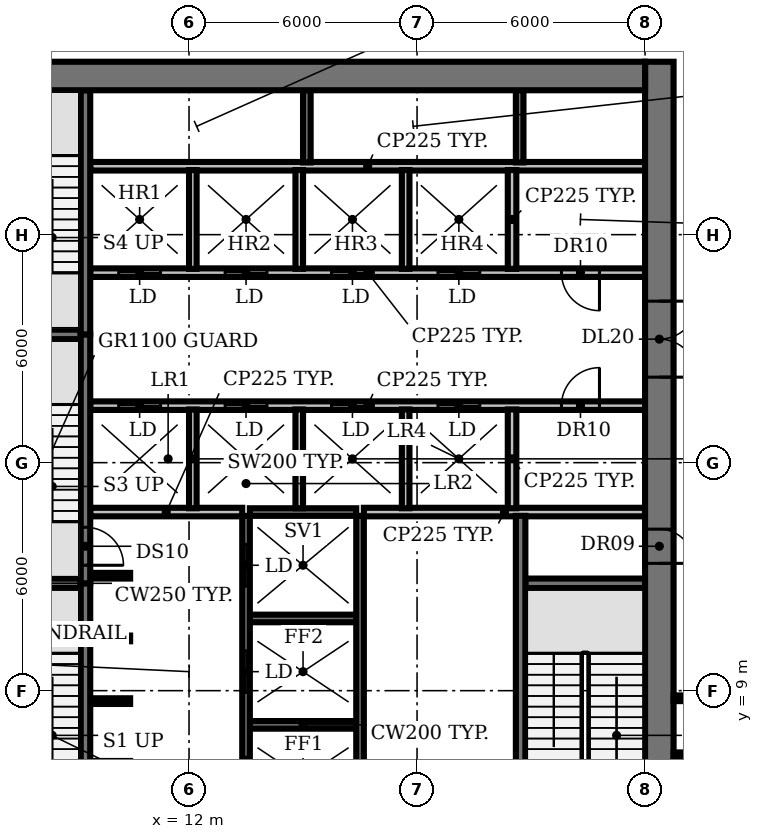
"""IFC4 building model, lengths in metres.
Left out: names, types, materials, properties, quantities, classifications, styles, units other than length and angle.
Written with IfcOpenShell. Run it as: python <this file> out.ifc"""

import sys

from ifc_helpers import new_model, si_unit, direction, frame, frame_2d, origin, place, context, subcontext, project, spatial, rectangle, extrude, element, fill, save


model = new_model("IFC4")
c1 = context("Model", 3, precision=1e-05, world=origin(), true_north=direction((0.0, 1.0)))
c2 = subcontext(c1, "Body", "Model", "MODEL_VIEW")
j1 = project(units=[si_unit("LENGTHUNIT", "METRE"), si_unit("PLANEANGLEUNIT", "RADIAN")], contexts=[c1])
p1 = place(None, origin())
s1 = spatial("IfcSite", under=j1, at=p1, CompositionType="ELEMENT")
p2 = place(p1, origin())
s2 = spatial("IfcBuilding", under=s1, at=p2, CompositionType="ELEMENT")
p3 = place(p2, frame((0.0, 0.0, 138.2)))
s3 = spatial("IfcBuildingStorey", under=s2, at=p3, CompositionType="ELEMENT", Elevation=138.2)
p4 = place(p3, frame((13.6, 8.1, 0.0), z_axis=(0.0, 0.0, 1.0), x_axis=(1.0, 0.0, 0.0)))
e1 = element("IfcWall", 1, at=p4, inside=s3, PredefinedType="SHEAR", context=c2, shape_type="SweptSolid", body=[
    extrude(rectangle(XDim=2.8, YDim=0.2, at=frame_2d((1.4, 0.0))), origin(), (0.0, 0.0, 1.0), 8.05),
])
for number, where, z_axis, x_axis in (
    (2, (9.4, 8.725, 0.0), (0.0, 0.0, 1.0), (1.0, 0.0, 0.0)),
    (3, (9.4, 10.375, 0.0), (0.0, 0.0, 1.0), (1.0, 0.0, 0.0)),
):
    element("IfcWall", number, at=place(p3, frame(where, z_axis=z_axis, x_axis=x_axis)), inside=s3, PredefinedType="SHEAR", context=c2, shape_type="SweptSolid", body=[
        extrude(rectangle(XDim=1.05, YDim=0.15, at=frame_2d((0.525, 0.0))), origin(), (0.0, 0.0, 1.0), 8.05),
    ])
p5 = place(p3, frame((13.6, 10.9, 0.0), z_axis=(0.0, 0.0, 1.0), x_axis=(1.0, 0.0, 0.0)))
e4 = element("IfcWall", 4, at=p5, inside=s3, PredefinedType="SHEAR", context=c2, shape_type="SweptSolid", body=[
    extrude(rectangle(XDim=2.8, YDim=0.2, at=frame_2d((1.4, 0.0))), origin(), (0.0, 0.0, 1.0), 8.05),
])
for number, where, z_axis, x_axis in (
    (5, (6.0, 11.825, 0.0), (0.0, 0.0, 1.0), (1.0, 0.0, 0.0)),
    (6, (20.85, 11.825, 0.0), (0.0, 0.0, 1.0), (1.0, 0.0, 0.0)),
):
    element("IfcWall", number, at=place(p3, frame(where, z_axis=z_axis, x_axis=x_axis)), inside=s3, PredefinedType="SHEAR", context=c2, shape_type="SweptSolid", body=[
        extrude(rectangle(XDim=3.15, YDim=0.25, at=frame_2d((1.575, 0.0))), origin(), (0.0, 0.0, 1.0), 8.05),
    ])
p6 = place(p3, frame((9.4, 12.025, 0.0), z_axis=(0.0, 0.0, 1.0), x_axis=(1.0, 0.0, 0.0)))
e7 = element("IfcWall", 7, at=p6, inside=s3, PredefinedType="SHEAR", context=c2, shape_type="SweptSolid", body=[
    extrude(rectangle(XDim=1.05, YDim=0.15, at=frame_2d((0.525, 0.0))), origin(), (0.0, 0.0, 1.0), 8.05),
])
p7 = place(p3, frame((9.4, 13.7, 0.0), z_axis=(0.0, 0.0, 1.0), x_axis=(1.0, 0.0, 0.0)))
e8 = element("IfcWall", 8, at=p7, inside=s3, PredefinedType="PARTITIONING", context=c2, shape_type="SweptSolid", body=[
    extrude(rectangle(XDim=4.0, YDim=0.225, at=frame_2d((2.0, 0.0))), origin(), (0.0, 0.0, 1.0), 8.05),
])
p8 = place(p3, frame((13.6, 13.7, 0.0), z_axis=(0.0, 0.0, 1.0), x_axis=(1.0, 0.0, 0.0)))
e9 = element("IfcWall", 9, at=p8, inside=s3, PredefinedType="SHEAR", context=c2, shape_type="SweptSolid", body=[
    extrude(rectangle(XDim=2.8, YDim=0.2, at=frame_2d((1.4, 0.0))), origin(), (0.0, 0.0, 1.0), 8.05),
])
p9 = place(p3, frame((16.6, 13.7, 0.0), z_axis=(0.0, 0.0, 1.0), x_axis=(1.0, 0.0, 0.0)))
e10 = element("IfcWall", 10, at=p9, inside=s3, PredefinedType="PARTITIONING", context=c2, shape_type="SweptSolid", body=[
    extrude(rectangle(XDim=7.4, YDim=0.225, at=frame_2d((3.7, 0.0))), origin(), (0.0, 0.0, 1.0), 8.05),
])
p10 = place(p3, frame((9.4, 16.5, 0.0), z_axis=(0.0, 0.0, 1.0), x_axis=(1.0, 0.0, 0.0)))
e11 = element("IfcWall", 11, at=p10, inside=s3, PredefinedType="PARTITIONING", context=c2, shape_type="SweptSolid", body=[
    extrude(rectangle(XDim=14.6, YDim=0.225, at=frame_2d((7.3, 0.0))), origin(), (0.0, 0.0, 1.0), 8.05),
])
p11 = place(p10, frame((0.75, 0.0, 0.0)))
e12 = element("IfcOpeningElement", 12, at=p11, cuts=e11, PredefinedType="OPENING", context=c2, shape_type="SweptSolid", body=[
    extrude(rectangle(XDim=1.1, YDim=2.1, at=frame_2d((0.55, 1.05))), frame((0.0, 0.123, 0.0), z_axis=(0.0, -1.0, 0.0), x_axis=(1.0, 0.0, 0.0)), (0.0, 0.0, 1.0), 0.245),
])
p12 = place(p10, frame((3.55, 0.0, 0.0)))
e13 = element("IfcOpeningElement", 13, at=p12, cuts=e11, PredefinedType="OPENING", context=c2, shape_type="SweptSolid", body=[
    extrude(rectangle(XDim=1.1, YDim=2.1, at=frame_2d((0.55, 1.05))), frame((0.0, 0.123, 0.0), z_axis=(0.0, -1.0, 0.0), x_axis=(1.0, 0.0, 0.0)), (0.0, 0.0, 1.0), 0.245),
])
p13 = place(p10, frame((6.35, 0.0, 0.0)))
e14 = element("IfcOpeningElement", 14, at=p13, cuts=e11, PredefinedType="OPENING", context=c2, shape_type="SweptSolid", body=[
    extrude(rectangle(XDim=1.1, YDim=2.1, at=frame_2d((0.55, 1.05))), frame((0.0, 0.123, 0.0), z_axis=(0.0, -1.0, 0.0), x_axis=(1.0, 0.0, 0.0)), (0.0, 0.0, 1.0), 0.245),
])
p14 = place(p10, frame((9.15, 0.0, 0.0)))
e15 = element("IfcOpeningElement", 15, at=p14, cuts=e11, PredefinedType="OPENING", context=c2, shape_type="SweptSolid", body=[
    extrude(rectangle(XDim=1.1, YDim=2.1, at=frame_2d((0.55, 1.05))), frame((0.0, 0.123, 0.0), z_axis=(0.0, -1.0, 0.0), x_axis=(1.0, 0.0, 0.0)), (0.0, 0.0, 1.0), 0.245),
])
p15 = place(p10, frame((12.4, 0.0, 0.0)))
e16 = element("IfcOpeningElement", 16, at=p15, cuts=e11, PredefinedType="OPENING", context=c2, shape_type="SweptSolid", body=[
    extrude(rectangle(XDim=1.0, YDim=2.1, at=frame_2d((0.5, 1.05))), frame((0.0, 0.123, 0.0), z_axis=(0.0, -1.0, 0.0), x_axis=(1.0, 0.0, 0.0)), (0.0, 0.0, 1.0), 0.245),
])
p16 = place(p3, frame((6.0, 18.375, 0.0), z_axis=(0.0, 0.0, 1.0), x_axis=(1.0, 0.0, 0.0)))
e17 = element("IfcWall", 17, at=p16, inside=s3, PredefinedType="SHEAR", context=c2, shape_type="SweptSolid", body=[
    extrude(rectangle(XDim=3.15, YDim=0.25, at=frame_2d((1.575, 0.0))), origin(), (0.0, 0.0, 1.0), 8.05),
])
p17 = place(p3, frame((24.0, 20.0, 0.0), z_axis=(0.0, 0.0, 1.0), x_axis=(-1.0, 0.0, 0.0)))
e18 = element("IfcWall", 18, at=p17, inside=s3, PredefinedType="PARTITIONING", context=c2, shape_type="SweptSolid", body=[
    extrude(rectangle(XDim=14.6, YDim=0.225, at=frame_2d((7.3, 0.0))), origin(), (0.0, 0.0, 1.0), 8.05),
])
p18 = place(p17, frame((12.75, 0.0, 0.0)))
e19 = element("IfcOpeningElement", 19, at=p18, cuts=e18, PredefinedType="OPENING", context=c2, shape_type="SweptSolid", body=[
    extrude(rectangle(XDim=1.1, YDim=2.1, at=frame_2d((0.55, 1.05))), frame((0.0, 0.123, 0.0), z_axis=(0.0, -1.0, 0.0), x_axis=(1.0, 0.0, 0.0)), (0.0, 0.0, 1.0), 0.245),
])
p19 = place(p17, frame((9.95, 0.0, 0.0)))
e20 = element("IfcOpeningElement", 20, at=p19, cuts=e18, PredefinedType="OPENING", context=c2, shape_type="SweptSolid", body=[
    extrude(rectangle(XDim=1.1, YDim=2.1, at=frame_2d((0.55, 1.05))), frame((0.0, 0.123, 0.0), z_axis=(0.0, -1.0, 0.0), x_axis=(1.0, 0.0, 0.0)), (0.0, 0.0, 1.0), 0.245),
])
p20 = place(p17, frame((7.15, 0.0, 0.0)))
e21 = element("IfcOpeningElement", 21, at=p20, cuts=e18, PredefinedType="OPENING", context=c2, shape_type="SweptSolid", body=[
    extrude(rectangle(XDim=1.1, YDim=2.1, at=frame_2d((0.55, 1.05))), frame((0.0, 0.123, 0.0), z_axis=(0.0, -1.0, 0.0), x_axis=(1.0, 0.0, 0.0)), (0.0, 0.0, 1.0), 0.245),
])
p21 = place(p17, frame((4.35, 0.0, 0.0)))
e22 = element("IfcOpeningElement", 22, at=p21, cuts=e18, PredefinedType="OPENING", context=c2, shape_type="SweptSolid", body=[
    extrude(rectangle(XDim=1.1, YDim=2.1, at=frame_2d((0.55, 1.05))), frame((0.0, 0.123, 0.0), z_axis=(0.0, -1.0, 0.0), x_axis=(1.0, 0.0, 0.0)), (0.0, 0.0, 1.0), 0.245),
])
p22 = place(p17, frame((1.2, 0.0, 0.0)))
e23 = element("IfcOpeningElement", 23, at=p22, cuts=e18, PredefinedType="OPENING", context=c2, shape_type="SweptSolid", body=[
    extrude(rectangle(XDim=1.0, YDim=2.1, at=frame_2d((0.5, 1.05))), frame((0.0, 0.123, 0.0), z_axis=(0.0, -1.0, 0.0), x_axis=(1.0, 0.0, 0.0)), (0.0, 0.0, 1.0), 0.245),
])
p23 = place(p3, frame((9.4, 22.8, 0.0), z_axis=(0.0, 0.0, 1.0), x_axis=(1.0, 0.0, 0.0)))
e24 = element("IfcWall", 24, at=p23, inside=s3, PredefinedType="PARTITIONING", context=c2, shape_type="SweptSolid", body=[
    extrude(rectangle(XDim=14.6, YDim=0.225, at=frame_2d((7.3, 0.0))), origin(), (0.0, 0.0, 1.0), 8.05),
])
p24 = place(p3, frame((9.275, 11.825, 0.0), z_axis=(0.0, 0.0, 1.0), x_axis=(0.0, -1.0, 0.0)))
e25 = element("IfcWall", 25, at=p24, inside=s3, PredefinedType="SHEAR", context=c2, shape_type="SweptSolid", body=[
    extrude(rectangle(XDim=6.425, YDim=0.25, at=frame_2d((3.212, 0.0))), origin(), (0.0, 0.0, 1.0), 8.05),
])
p25 = place(p24, frame((5.075, 0.0, 0.0)))
e26 = element("IfcOpeningElement", 26, at=p25, cuts=e25, PredefinedType="OPENING", context=c2, shape_type="SweptSolid", body=[
    extrude(rectangle(XDim=1.0, YDim=2.1, at=frame_2d((0.5, 1.05))), frame((0.0, 0.135, 0.0), z_axis=(0.0, -1.0, 0.0), x_axis=(1.0, 0.0, 0.0)), (0.0, 0.0, 1.0), 0.27),
])
p26 = place(p3, frame((9.275, 18.375, 0.0), z_axis=(0.0, 0.0, 1.0), x_axis=(0.0, -1.0, 0.0)))
e27 = element("IfcWall", 27, at=p26, inside=s3, PredefinedType="SHEAR", context=c2, shape_type="SweptSolid", body=[
    extrude(rectangle(XDim=6.55, YDim=0.25, at=frame_2d((3.275, 0.0))), origin(), (0.0, 0.0, 1.0), 8.05),
])
p27 = place(p26, frame((5.075, 0.0, 0.0)))
e28 = element("IfcOpeningElement", 28, at=p27, cuts=e27, PredefinedType="OPENING", context=c2, shape_type="SweptSolid", body=[
    extrude(rectangle(XDim=1.0, YDim=2.1, at=frame_2d((0.5, 1.05))), frame((0.0, 0.135, 0.0), z_axis=(0.0, -1.0, 0.0), x_axis=(1.0, 0.0, 0.0)), (0.0, 0.0, 1.0), 0.27),
])
p28 = place(p3, frame((9.275, 18.375, 0.0), z_axis=(0.0, 0.0, 1.0), x_axis=(0.0, 1.0, 0.0)))
e29 = element("IfcWall", 29, at=p28, inside=s3, PredefinedType="SHEAR", context=c2, shape_type="SweptSolid", body=[
    extrude(rectangle(XDim=6.425, YDim=0.25, at=frame_2d((3.212, 0.0))), origin(), (0.0, 0.0, 1.0), 8.05),
])
for number, where, z_axis, x_axis in (
    (30, (12.1, 13.8, 0.0), (0.0, 0.0, 1.0), (0.0, 1.0, 0.0)),
    (31, (12.1, 20.1, 0.0), (0.0, 0.0, 1.0), (0.0, 1.0, 0.0)),
):
    element("IfcWall", number, at=place(p3, frame(where, z_axis=z_axis, x_axis=x_axis)), inside=s3, PredefinedType="SOLIDWALL", context=c2, shape_type="SweptSolid", body=[
        extrude(rectangle(XDim=2.6, YDim=0.2, at=frame_2d((1.3, 0.0))), origin(), (0.0, 0.0, 1.0), 8.05),
    ])
p29 = place(p3, frame((13.5, 5.4, 0.0), z_axis=(0.0, 0.0, 1.0), x_axis=(0.0, 1.0, 0.0)))
e32 = element("IfcWall", 32, at=p29, inside=s3, PredefinedType="SHEAR", context=c2, shape_type="SweptSolid", body=[
    extrude(rectangle(XDim=8.2, YDim=0.2, at=frame_2d((4.1, 0.0))), origin(), (0.0, 0.0, 1.0), 8.05),
])
p30 = place(p29, frame((0.75, 0.0, 0.0)))
e33 = element("IfcOpeningElement", 33, at=p30, cuts=e32, PredefinedType="OPENING", context=c2, shape_type="SweptSolid", body=[
    extrude(rectangle(XDim=1.1, YDim=2.1, at=frame_2d((0.55, 1.05))), frame((0.0, 0.11, 0.0), z_axis=(0.0, -1.0, 0.0), x_axis=(1.0, 0.0, 0.0)), (0.0, 0.0, 1.0), 0.22),
])
p31 = place(p29, frame((3.55, 0.0, 0.0)))
e34 = element("IfcOpeningElement", 34, at=p31, cuts=e32, PredefinedType="OPENING", context=c2, shape_type="SweptSolid", body=[
    extrude(rectangle(XDim=1.1, YDim=2.1, at=frame_2d((0.55, 1.05))), frame((0.0, 0.11, 0.0), z_axis=(0.0, -1.0, 0.0), x_axis=(1.0, 0.0, 0.0)), (0.0, 0.0, 1.0), 0.22),
])
p32 = place(p29, frame((6.35, 0.0, 0.0)))
e35 = element("IfcOpeningElement", 35, at=p32, cuts=e32, PredefinedType="OPENING", context=c2, shape_type="SweptSolid", body=[
    extrude(rectangle(XDim=1.1, YDim=2.1, at=frame_2d((0.55, 1.05))), frame((0.0, 0.11, 0.0), z_axis=(0.0, -1.0, 0.0), x_axis=(1.0, 0.0, 0.0)), (0.0, 0.0, 1.0), 0.22),
])
for number, where, z_axis, x_axis in (
    (36, (14.9, 13.8, 0.0), (0.0, 0.0, 1.0), (0.0, 1.0, 0.0)),
    (37, (14.9, 20.1, 0.0), (0.0, 0.0, 1.0), (0.0, 1.0, 0.0)),
):
    element("IfcWall", number, at=place(p3, frame(where, z_axis=z_axis, x_axis=x_axis)), inside=s3, PredefinedType="SOLIDWALL", context=c2, shape_type="SweptSolid", body=[
        extrude(rectangle(XDim=2.6, YDim=0.2, at=frame_2d((1.3, 0.0))), origin(), (0.0, 0.0, 1.0), 8.05),
    ])
p33 = place(p3, frame((15.1, 22.9, 0.0), z_axis=(0.0, 0.0, 1.0), x_axis=(0.0, 1.0, 0.0)))
e38 = element("IfcWall", 38, at=p33, inside=s3, PredefinedType="SHEAR", context=c2, shape_type="SweptSolid", body=[
    extrude(rectangle(XDim=1.9, YDim=0.2, at=frame_2d((0.95, 0.0))), origin(), (0.0, 0.0, 1.0), 8.05),
])
p34 = place(p3, frame((16.5, 5.4, 0.0), z_axis=(0.0, 0.0, 1.0), x_axis=(0.0, 1.0, 0.0)))
e39 = element("IfcWall", 39, at=p34, inside=s3, PredefinedType="SHEAR", context=c2, shape_type="SweptSolid", body=[
    extrude(rectangle(XDim=8.2, YDim=0.2, at=frame_2d((4.1, 0.0))), origin(), (0.0, 0.0, 1.0), 8.05),
])
for number, where, z_axis, x_axis in (
    (40, (17.7, 13.8, 0.0), (0.0, 0.0, 1.0), (0.0, 1.0, 0.0)),
    (41, (17.7, 20.1, 0.0), (0.0, 0.0, 1.0), (0.0, 1.0, 0.0)),
):
    element("IfcWall", number, at=place(p3, frame(where, z_axis=z_axis, x_axis=x_axis)), inside=s3, PredefinedType="SOLIDWALL", context=c2, shape_type="SweptSolid", body=[
        extrude(rectangle(XDim=2.6, YDim=0.2, at=frame_2d((1.3, 0.0))), origin(), (0.0, 0.0, 1.0), 8.05),
    ])
for number, where, z_axis, x_axis in (
    (42, (20.5, 13.8, 0.0), (0.0, 0.0, 1.0), (0.0, 1.0, 0.0)),
    (43, (20.5, 20.1, 0.0), (0.0, 0.0, 1.0), (0.0, 1.0, 0.0)),
):
    element("IfcWall", number, at=place(p3, frame(where, z_axis=z_axis, x_axis=x_axis)), inside=s3, PredefinedType="PARTITIONING", context=c2, shape_type="SweptSolid", body=[
        extrude(rectangle(XDim=2.6, YDim=0.225, at=frame_2d((1.3, 0.0))), origin(), (0.0, 0.0, 1.0), 8.05),
    ])
p35 = place(p3, frame((20.7, 22.9, 0.0), z_axis=(0.0, 0.0, 1.0), x_axis=(0.0, 1.0, 0.0)))
e44 = element("IfcWall", 44, at=p35, inside=s3, PredefinedType="SHEAR", context=c2, shape_type="SweptSolid", body=[
    extrude(rectangle(XDim=1.9, YDim=0.2, at=frame_2d((0.95, 0.0))), origin(), (0.0, 0.0, 1.0), 8.05),
])
p36 = place(p3, frame((20.725, 5.4, 0.0), z_axis=(0.0, 0.0, 1.0), x_axis=(0.0, 1.0, 0.0)))
e45 = element("IfcWall", 45, at=p36, inside=s3, PredefinedType="SHEAR", context=c2, shape_type="SweptSolid", body=[
    extrude(rectangle(XDim=8.2, YDim=0.25, at=frame_2d((4.1, 0.0))), origin(), (0.0, 0.0, 1.0), 8.05),
])
p37 = place(p3, frame((24.375, 25.55, 0.0), z_axis=(0.0, 0.0, 1.0), x_axis=(0.0, -1.0, 0.0)))
e46 = element("IfcWall", 46, at=p37, inside=s3, PredefinedType="SHEAR", context=c2, shape_type="SweptSolid", body=[
    extrude(rectangle(XDim=20.9, YDim=0.75, at=frame_2d((10.45, 0.0))), origin(), (0.0, 0.0, 1.0), 8.05),
])
p38 = place(p37, frame((18.4, 0.0, 0.0)))
e47 = element("IfcOpeningElement", 47, at=p38, cuts=e46, PredefinedType="OPENING", context=c2, shape_type="SweptSolid", body=[
    extrude(rectangle(XDim=1.5, YDim=2.1, at=frame_2d((0.75, 1.05))), frame((0.0, 0.385, 0.0), z_axis=(0.0, -1.0, 0.0), x_axis=(1.0, 0.0, 0.0)), (0.0, 0.0, 1.0), 0.77),
])
p39 = place(p37, frame((12.3, 0.0, 0.0)))
e48 = element("IfcOpeningElement", 48, at=p39, cuts=e46, PredefinedType="OPENING", context=c2, shape_type="SweptSolid", body=[
    extrude(rectangle(XDim=0.9, YDim=2.1, at=frame_2d((0.45, 1.05))), frame((0.0, 0.385, 0.0), z_axis=(0.0, -1.0, 0.0), x_axis=(1.0, 0.0, 0.0)), (0.0, 0.0, 1.0), 0.77),
])
p40 = place(p37, frame((6.3, 0.0, 0.0)))
e49 = element("IfcOpeningElement", 49, at=p40, cuts=e46, PredefinedType="OPENING", context=c2, shape_type="SweptSolid", body=[
    extrude(rectangle(XDim=2.0, YDim=2.1, at=frame_2d((1.0, 1.05))), frame((0.0, 0.385, 0.0), z_axis=(0.0, -1.0, 0.0), x_axis=(1.0, 0.0, 0.0)), (0.0, 0.0, 1.0), 0.77),
])
p41 = place(p3, frame((6.0, 25.175, 0.0), z_axis=(0.0, 0.0, 1.0), x_axis=(1.0, 0.0, 0.0)))
e50 = element("IfcWall", 50, at=p41, inside=s3, PredefinedType="SHEAR", context=c2, shape_type="SweptSolid", body=[
    extrude(rectangle(XDim=18.0, YDim=0.75, at=frame_2d((9.0, 0.0))), origin(), (0.0, 0.0, 1.0), 8.05),
])
for number, where, z_axis, x_axis in (
    (51, (24.75, 7.3, 0.0), (0.0, 0.0, 1.0), (1.0, 0.0, 0.0)),
    (52, (24.75, 8.8, 0.0), (0.0, 0.0, 1.0), (1.0, 0.0, 0.0)),
):
    element("IfcWall", number, at=place(p3, frame(where, z_axis=z_axis, x_axis=x_axis)), inside=s3, PredefinedType="PARTITIONING", context=c2, shape_type="SweptSolid", body=[
        extrude(rectangle(XDim=1.05, YDim=0.15, at=frame_2d((0.525, 0.0))), origin(), (0.0, 0.0, 1.0), 6.33),
    ])
p42 = place(p11, origin())
e53 = element("IfcDoor", 53, at=p42, inside=s3, OperationType="DOUBLE_DOOR_SLIDING", PredefinedType="DOOR", context=c2, shape_type="SweptSolid", body=[
    extrude(rectangle(XDim=1.1, YDim=2.1, at=frame_2d((0.55, 1.05))), frame((0.0, 0.025, 0.0), z_axis=(0.0, -1.0, 0.0), x_axis=(1.0, 0.0, 0.0)), (0.0, 0.0, 1.0), 0.05),
])
fill(e12, e53)
p43 = place(p12, origin())
e54 = element("IfcDoor", 54, at=p43, inside=s3, OperationType="DOUBLE_DOOR_SLIDING", PredefinedType="DOOR", context=c2, shape_type="SweptSolid", body=[
    extrude(rectangle(XDim=1.1, YDim=2.1, at=frame_2d((0.55, 1.05))), frame((0.0, 0.025, 0.0), z_axis=(0.0, -1.0, 0.0), x_axis=(1.0, 0.0, 0.0)), (0.0, 0.0, 1.0), 0.05),
])
fill(e13, e54)
p44 = place(p13, origin())
e55 = element("IfcDoor", 55, at=p44, inside=s3, OperationType="DOUBLE_DOOR_SLIDING", PredefinedType="DOOR", context=c2, shape_type="SweptSolid", body=[
    extrude(rectangle(XDim=1.1, YDim=2.1, at=frame_2d((0.55, 1.05))), frame((0.0, 0.025, 0.0), z_axis=(0.0, -1.0, 0.0), x_axis=(1.0, 0.0, 0.0)), (0.0, 0.0, 1.0), 0.05),
])
fill(e14, e55)
p45 = place(p14, origin())
e56 = element("IfcDoor", 56, at=p45, inside=s3, OperationType="DOUBLE_DOOR_SLIDING", PredefinedType="DOOR", context=c2, shape_type="SweptSolid", body=[
    extrude(rectangle(XDim=1.1, YDim=2.1, at=frame_2d((0.55, 1.05))), frame((0.0, 0.025, 0.0), z_axis=(0.0, -1.0, 0.0), x_axis=(1.0, 0.0, 0.0)), (0.0, 0.0, 1.0), 0.05),
])
fill(e15, e56)
p46 = place(p15, origin())
e57 = element("IfcDoor", 57, at=p46, inside=s3, OperationType="SINGLE_SWING_RIGHT", PredefinedType="DOOR", context=c2, shape_type="SweptSolid", body=[
    extrude(rectangle(XDim=1.0, YDim=2.1, at=frame_2d((0.5, 1.05))), frame((0.0, 0.025, 0.0), z_axis=(0.0, -1.0, 0.0), x_axis=(1.0, 0.0, 0.0)), (0.0, 0.0, 1.0), 0.05),
])
fill(e16, e57)
p47 = place(p18, origin())
e58 = element("IfcDoor", 58, at=p47, inside=s3, OperationType="DOUBLE_DOOR_SLIDING", PredefinedType="DOOR", context=c2, shape_type="SweptSolid", body=[
    extrude(rectangle(XDim=1.1, YDim=2.1, at=frame_2d((0.55, 1.05))), frame((0.0, 0.025, 0.0), z_axis=(0.0, -1.0, 0.0), x_axis=(1.0, 0.0, 0.0)), (0.0, 0.0, 1.0), 0.05),
])
fill(e19, e58)
p48 = place(p19, origin())
e59 = element("IfcDoor", 59, at=p48, inside=s3, OperationType="DOUBLE_DOOR_SLIDING", PredefinedType="DOOR", context=c2, shape_type="SweptSolid", body=[
    extrude(rectangle(XDim=1.1, YDim=2.1, at=frame_2d((0.55, 1.05))), frame((0.0, 0.025, 0.0), z_axis=(0.0, -1.0, 0.0), x_axis=(1.0, 0.0, 0.0)), (0.0, 0.0, 1.0), 0.05),
])
fill(e20, e59)
p49 = place(p20, origin())
e60 = element("IfcDoor", 60, at=p49, inside=s3, OperationType="DOUBLE_DOOR_SLIDING", PredefinedType="DOOR", context=c2, shape_type="SweptSolid", body=[
    extrude(rectangle(XDim=1.1, YDim=2.1, at=frame_2d((0.55, 1.05))), frame((0.0, 0.025, 0.0), z_axis=(0.0, -1.0, 0.0), x_axis=(1.0, 0.0, 0.0)), (0.0, 0.0, 1.0), 0.05),
])
fill(e21, e60)
p50 = place(p21, origin())
e61 = element("IfcDoor", 61, at=p50, inside=s3, OperationType="DOUBLE_DOOR_SLIDING", PredefinedType="DOOR", context=c2, shape_type="SweptSolid", body=[
    extrude(rectangle(XDim=1.1, YDim=2.1, at=frame_2d((0.55, 1.05))), frame((0.0, 0.025, 0.0), z_axis=(0.0, -1.0, 0.0), x_axis=(1.0, 0.0, 0.0)), (0.0, 0.0, 1.0), 0.05),
])
fill(e22, e61)
p51 = place(p22, origin())
e62 = element("IfcDoor", 62, at=p51, inside=s3, OperationType="SINGLE_SWING_LEFT", PredefinedType="DOOR", context=c2, shape_type="SweptSolid", body=[
    extrude(rectangle(XDim=1.0, YDim=2.1, at=frame_2d((0.5, 1.05))), frame((0.0, 0.025, 0.0), z_axis=(0.0, -1.0, 0.0), x_axis=(1.0, 0.0, 0.0)), (0.0, 0.0, 1.0), 0.05),
])
fill(e23, e62)
p52 = place(p27, origin())
e63 = element("IfcDoor", 63, at=p52, inside=s3, OperationType="SINGLE_SWING_RIGHT", PredefinedType="DOOR", context=c2, shape_type="SweptSolid", body=[
    extrude(rectangle(XDim=1.0, YDim=2.1, at=frame_2d((0.5, 1.05))), frame((0.0, 0.025, 0.0), z_axis=(0.0, -1.0, 0.0), x_axis=(1.0, 0.0, 0.0)), (0.0, 0.0, 1.0), 0.05),
])
fill(e28, e63)
p53 = place(p30, origin())
e64 = element("IfcDoor", 64, at=p53, inside=s3, OperationType="DOUBLE_DOOR_SLIDING", PredefinedType="DOOR", context=c2, shape_type="SweptSolid", body=[
    extrude(rectangle(XDim=1.1, YDim=2.1, at=frame_2d((0.55, 1.05))), frame((0.0, 0.025, 0.0), z_axis=(0.0, -1.0, 0.0), x_axis=(1.0, 0.0, 0.0)), (0.0, 0.0, 1.0), 0.05),
])
fill(e33, e64)
p54 = place(p31, origin())
e65 = element("IfcDoor", 65, at=p54, inside=s3, OperationType="DOUBLE_DOOR_SLIDING", PredefinedType="DOOR", context=c2, shape_type="SweptSolid", body=[
    extrude(rectangle(XDim=1.1, YDim=2.1, at=frame_2d((0.55, 1.05))), frame((0.0, 0.025, 0.0), z_axis=(0.0, -1.0, 0.0), x_axis=(1.0, 0.0, 0.0)), (0.0, 0.0, 1.0), 0.05),
])
fill(e34, e65)
p55 = place(p32, origin())
e66 = element("IfcDoor", 66, at=p55, inside=s3, OperationType="DOUBLE_DOOR_SLIDING", PredefinedType="DOOR", context=c2, shape_type="SweptSolid", body=[
    extrude(rectangle(XDim=1.1, YDim=2.1, at=frame_2d((0.55, 1.05))), frame((0.0, 0.025, 0.0), z_axis=(0.0, -1.0, 0.0), x_axis=(1.0, 0.0, 0.0)), (0.0, 0.0, 1.0), 0.05),
])
fill(e35, e66)
p56 = place(p39, origin())
e67 = element("IfcDoor", 67, at=p56, inside=s3, OperationType="SINGLE_SWING_RIGHT", PredefinedType="DOOR", context=c2, shape_type="SweptSolid", body=[
    extrude(rectangle(XDim=0.9, YDim=2.1, at=frame_2d((0.45, 1.05))), frame((0.0, -0.315, 0.0), z_axis=(0.0, -1.0, 0.0), x_axis=(1.0, 0.0, 0.0)), (0.0, 0.0, 1.0), 0.05),
])
fill(e48, e67)
p57 = place(p40, origin())
e68 = element("IfcDoor", 68, at=p57, inside=s3, OperationType="DOUBLE_DOOR_SINGLE_SWING", PredefinedType="DOOR", context=c2, shape_type="SweptSolid", body=[
    extrude(rectangle(XDim=2.0, YDim=2.1, at=frame_2d((1.0, 1.05))), frame((0.0, 0.025, 0.0), z_axis=(0.0, -1.0, 0.0), x_axis=(1.0, 0.0, 0.0)), (0.0, 0.0, 1.0), 0.05),
])
fill(e49, e68)
save(model, sys.argv[1])
